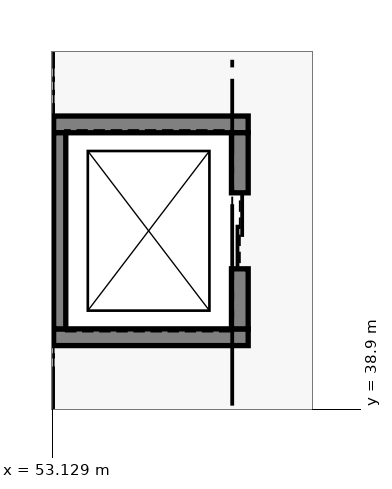
"""IFC4 building model, lengths in metres.
Left out: names, types, materials, properties, quantities, classifications, styles, units other than length and angle.
Written with IfcOpenShell. Run it as: python <this file> out.ifc"""

import sys

from ifc_helpers import new_model, si_unit, direction, frame, frame_2d, origin, place, context, subcontext, project, spatial, rectangle, extrude, element, fill, save


model = new_model("IFC4")
c1 = context("Model", 3, precision=1e-05, world=origin(), true_north=direction((0.0, 1.0)))
c2 = subcontext(c1, "Body", "Model", "MODEL_VIEW")
j1 = project(units=[si_unit("LENGTHUNIT", "METRE"), si_unit("PLANEANGLEUNIT", "RADIAN")], contexts=[c1])
p1 = place(None, origin())
s1 = spatial("IfcSite", under=j1, at=p1, CompositionType="ELEMENT")
p2 = place(p1, origin())
s2 = spatial("IfcBuilding", under=s1, at=p2, CompositionType="ELEMENT")
p3 = place(p2, frame((0.0, 0.0, 21.0)))
s3 = spatial("IfcBuildingStorey", under=s2, at=p3, CompositionType="ELEMENT", Elevation=21.0)
for number, where, z_axis, x_axis in (
    (1, (53.09, 39.85, 0.0), (0.0, 0.0, 1.0), (1.0, 0.0, 0.0)),
    (2, (53.09, 42.65, 0.0), (0.0, 0.0, 1.0), (1.0, 0.0, 0.0)),
):
    element("IfcWall", number, at=place(p3, frame(where, z_axis=z_axis, x_axis=x_axis)), inside=s3, PredefinedType="SOLIDWALL", context=c2, shape_type="SweptSolid", body=[
        extrude(rectangle(XDim=2.62, YDim=0.22, at=frame_2d((1.31, 0.0))), origin(), (0.0, 0.0, 1.0), 3.92),
    ])
p4 = place(p3, frame((53.2, 39.96, 0.0), z_axis=(0.0, 0.0, 1.0), x_axis=(0.0, 1.0, 0.0)))
e3 = element("IfcWall", 3, at=p4, inside=s3, PredefinedType="SOLIDWALL", context=c2, shape_type="SweptSolid", body=[
    extrude(rectangle(XDim=2.58, YDim=0.22, at=frame_2d((1.29, 0.0))), origin(), (0.0, 0.0, 1.0), 3.92),
])
p5 = place(p3, frame((55.6, 39.96, 0.0), z_axis=(0.0, 0.0, 1.0), x_axis=(0.0, 1.0, 0.0)))
e4 = element("IfcWall", 4, at=p5, inside=s3, PredefinedType="SOLIDWALL", context=c2, shape_type="SweptSolid", body=[
    extrude(rectangle(XDim=2.58, YDim=0.22, at=frame_2d((1.29, 0.0))), origin(), (0.0, 0.0, 1.0), 3.92),
])
p6 = place(p5, frame((0.79, 0.0, 0.0)))
e5 = element("IfcOpeningElement", 5, at=p6, cuts=e4, PredefinedType="OPENING", context=c2, shape_type="SweptSolid", body=[
    extrude(rectangle(XDim=1.0, YDim=2.15, at=frame_2d((0.5, 1.075))), frame((0.0, 0.12, 0.0), z_axis=(0.0, -1.0, 0.0), x_axis=(1.0, 0.0, 0.0)), (0.0, 0.0, 1.0), 0.24),
])
p7 = place(p6, origin())
e6 = element("IfcDoor", 6, at=p7, inside=s3, OperationType="SLIDING_TO_LEFT", PredefinedType="DOOR", context=c2, shape_type="SweptSolid", body=[
    extrude(rectangle(XDim=1.0, YDim=2.15, at=frame_2d((0.5, 1.075))), frame((0.0, 0.025, 0.0), z_axis=(0.0, -1.0, 0.0), x_axis=(1.0, 0.0, 0.0)), (0.0, 0.0, 1.0), 0.05),
])
fill(e5, e6)
save(model, sys.argv[1])
